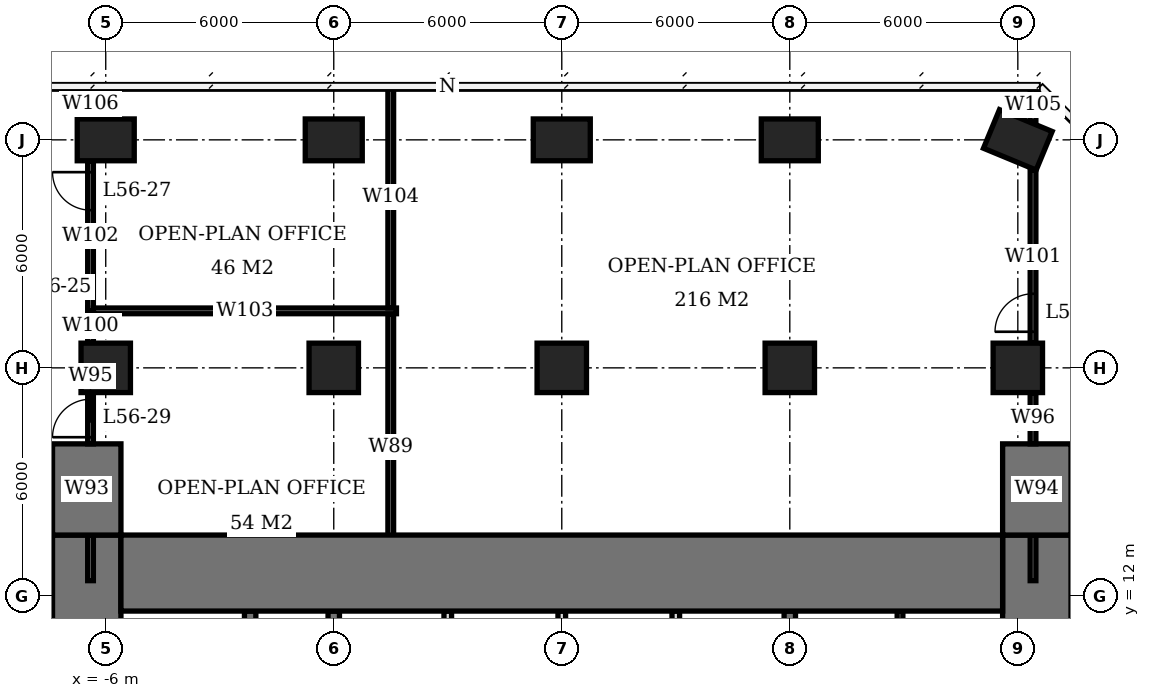
"""IFC4 building model, lengths in metres.
Left out: names, types, materials, properties, quantities, classifications, styles, units other than length and angle.
Written with IfcOpenShell. Run it as: python <this file> out.ifc"""

import sys

from ifc_helpers import new_model, si_unit, direction, frame, frame_2d, origin, origin_2d, place, context, subcontext, project, spatial, rectangle, extrude, element, fill, save


model = new_model("IFC4")
c1 = context("Model", 3, precision=1e-05, world=origin(), true_north=direction((0.0, 1.0)))
c2 = subcontext(c1, "Body", "Model", "MODEL_VIEW")
j1 = project(units=[si_unit("LENGTHUNIT", "METRE"), si_unit("PLANEANGLEUNIT", "RADIAN")], contexts=[c1])
p1 = place(None, origin())
s1 = spatial("IfcSite", under=j1, at=p1, CompositionType="ELEMENT")
p2 = place(p1, origin())
s2 = spatial("IfcBuilding", under=s1, at=p2, CompositionType="ELEMENT")
p3 = place(p2, frame((0.0, 0.0, 227.9)))
s3 = spatial("IfcBuildingStorey", under=s2, at=p3, CompositionType="ELEMENT", Elevation=227.9)
p4 = place(p3, frame((-6.0, 18.0, 0.0), z_axis=(0.0, 0.0, 1.0), x_axis=(1.0, 0.0, 0.0)))
e1 = element("IfcColumn", 1, at=p4, inside=s3, PredefinedType="COLUMN", context=c2, shape_type="SweptSolid", body=[
    extrude(rectangle(XDim=1.3, YDim=1.3, at=origin_2d()), origin(), (0.0, 0.0, 1.0), 3.9),
])
p5 = place(p3, frame((-6.0, 24.0, 0.0), z_axis=(0.0, 0.0, 1.0), x_axis=(1.0, 0.0, 0.0)))
e2 = element("IfcColumn", 2, at=p5, inside=s3, PredefinedType="COLUMN", context=c2, shape_type="SweptSolid", body=[
    extrude(rectangle(XDim=1.5, YDim=1.1, at=origin_2d()), origin(), (0.0, 0.0, 1.0), 3.9),
])
p6 = place(p3, frame((0.0, 18.0, 0.0), z_axis=(0.0, 0.0, 1.0), x_axis=(1.0, 0.0, 0.0)))
e3 = element("IfcColumn", 3, at=p6, inside=s3, PredefinedType="COLUMN", context=c2, shape_type="SweptSolid", body=[
    extrude(rectangle(XDim=1.3, YDim=1.3, at=origin_2d()), origin(), (0.0, 0.0, 1.0), 3.9),
])
p7 = place(p3, frame((0.0, 24.0, 0.0), z_axis=(0.0, 0.0, 1.0), x_axis=(1.0, 0.0, 0.0)))
e4 = element("IfcColumn", 4, at=p7, inside=s3, PredefinedType="COLUMN", context=c2, shape_type="SweptSolid", body=[
    extrude(rectangle(XDim=1.5, YDim=1.1, at=origin_2d()), origin(), (0.0, 0.0, 1.0), 3.9),
])
p8 = place(p3, frame((6.0, 18.0, 0.0), z_axis=(0.0, 0.0, 1.0), x_axis=(1.0, 0.0, 0.0)))
e5 = element("IfcColumn", 5, at=p8, inside=s3, PredefinedType="COLUMN", context=c2, shape_type="SweptSolid", body=[
    extrude(rectangle(XDim=1.3, YDim=1.3, at=origin_2d()), origin(), (0.0, 0.0, 1.0), 3.9),
])
p9 = place(p3, frame((6.0, 24.0, 0.0), z_axis=(0.0, 0.0, 1.0), x_axis=(1.0, 0.0, 0.0)))
e6 = element("IfcColumn", 6, at=p9, inside=s3, PredefinedType="COLUMN", context=c2, shape_type="SweptSolid", body=[
    extrude(rectangle(XDim=1.5, YDim=1.1, at=origin_2d()), origin(), (0.0, 0.0, 1.0), 3.9),
])
p10 = place(p3, frame((12.0, 18.0, 0.0), z_axis=(0.0, 0.0, 1.0), x_axis=(1.0, 0.0, 0.0)))
e7 = element("IfcColumn", 7, at=p10, inside=s3, PredefinedType="COLUMN", context=c2, shape_type="SweptSolid", body=[
    extrude(rectangle(XDim=1.3, YDim=1.3, at=origin_2d()), origin(), (0.0, 0.0, 1.0), 3.9),
])
p11 = place(p3, frame((12.0, 24.0, 0.0), z_axis=(0.0, 0.0, 1.0), x_axis=(1.0, 0.0, 0.0)))
e8 = element("IfcColumn", 8, at=p11, inside=s3, PredefinedType="COLUMN", context=c2, shape_type="SweptSolid", body=[
    extrude(rectangle(XDim=1.5, YDim=1.1, at=origin_2d()), origin(), (0.0, 0.0, 1.0), 3.9),
])
p12 = place(p3, frame((18.0, 18.0, 0.0), z_axis=(0.0, 0.0, 1.0), x_axis=(1.0, 0.0, 0.0)))
e9 = element("IfcColumn", 9, at=p12, inside=s3, PredefinedType="COLUMN", context=c2, shape_type="SweptSolid", body=[
    extrude(rectangle(XDim=1.3, YDim=1.3, at=origin_2d()), origin(), (0.0, 0.0, 1.0), 3.9),
])
p13 = place(p3, frame((18.0, 24.0, 0.0), z_axis=(0.0, 0.0, 1.0), x_axis=(0.923879532511, -0.382683432365, 0.0)))
e10 = element("IfcColumn", 10, at=p13, inside=s3, PredefinedType="COLUMN", context=c2, shape_type="SweptSolid", body=[
    extrude(rectangle(XDim=1.5, YDim=1.1, at=origin_2d()), origin(), (0.0, 0.0, 1.0), 3.9),
])
p14 = place(p3, frame((-5.6, 12.6, 0.0), z_axis=(0.0, 0.0, 1.0), x_axis=(1.0, 0.0, 0.0)))
e11 = element("IfcWall", 11, at=p14, inside=s3, PredefinedType="SHEAR", context=c2, shape_type="SweptSolid", body=[
    extrude(rectangle(XDim=23.2, YDim=2.0, at=frame_2d((11.6, 0.0))), origin(), (0.0, 0.0, 1.0), 3.9),
])
p15 = place(p3, frame((-6.5, -7.6, 0.0), z_axis=(0.0, 0.0, 1.0), x_axis=(0.0, 1.0, 0.0)))
e12 = element("IfcWall", 12, at=p15, inside=s3, PredefinedType="SHEAR", context=c2, shape_type="SweptSolid", body=[
    extrude(rectangle(XDim=21.2, YDim=1.8, at=frame_2d((10.6, 0.0))), origin(), (0.0, 0.0, 1.0), 3.9),
])
p16 = place(p15, frame((7.8, 0.0, 0.0)))
e13 = element("IfcOpeningElement", 13, at=p16, cuts=e12, PredefinedType="OPENING", context=c2, shape_type="SweptSolid", body=[
    extrude(rectangle(XDim=1.8, YDim=2.4, at=frame_2d((0.9, 1.2))), frame((0.0, 0.91, 0.0), z_axis=(0.0, -1.0, 0.0), x_axis=(1.0, 0.0, 0.0)), (0.0, 0.0, 1.0), 1.82),
])
p17 = place(p3, frame((18.5, -7.6, 0.0), z_axis=(0.0, 0.0, 1.0), x_axis=(0.0, 1.0, 0.0)))
e14 = element("IfcWall", 14, at=p17, inside=s3, PredefinedType="SHEAR", context=c2, shape_type="SweptSolid", body=[
    extrude(rectangle(XDim=21.2, YDim=1.8, at=frame_2d((10.6, 0.0))), origin(), (0.0, 0.0, 1.0), 3.9),
])
p18 = place(p17, frame((9.2, 0.0, 0.0)))
e15 = element("IfcOpeningElement", 15, at=p18, cuts=e14, PredefinedType="OPENING", context=c2, shape_type="SweptSolid", body=[
    extrude(rectangle(XDim=1.8, YDim=2.4, at=frame_2d((0.9, 1.2))), frame((0.0, 0.91, 0.0), z_axis=(0.0, -1.0, 0.0), x_axis=(1.0, 0.0, 0.0)), (0.0, 0.0, 1.0), 1.82),
])
for number, where, z_axis, x_axis in (
    (16, (-6.5, 13.6, 0.0), (0.0, 0.0, 1.0), (0.0, 1.0, 0.0)),
    (17, (18.5, 13.6, 0.0), (0.0, 0.0, 1.0), (0.0, 1.0, 0.0)),
):
    element("IfcWall", number, at=place(p3, frame(where, z_axis=z_axis, x_axis=x_axis)), inside=s3, PredefinedType="SHEAR", context=c2, shape_type="SweptSolid", body=[
        extrude(rectangle(XDim=2.4, YDim=1.8, at=frame_2d((1.2, 0.0))), origin(), (0.0, 0.0, 1.0), 3.9),
    ])
p19 = place(p3, frame((0.0, 3.15, 0.0), z_axis=(0.0, 0.0, 1.0), x_axis=(0.0, 1.0, 0.0)))
e18 = element("IfcWall", 18, at=p19, inside=s3, PredefinedType="SHEAR", context=c2, shape_type="SweptSolid", body=[
    extrude(rectangle(XDim=8.45, YDim=0.3, at=frame_2d((4.225, 0.0))), origin(), (0.0, 0.0, 1.0), 3.9),
])
p20 = place(p3, frame((12.0, 6.15, 0.0), z_axis=(0.0, 0.0, 1.0), x_axis=(0.0, 1.0, 0.0)))
e19 = element("IfcWall", 19, at=p20, inside=s3, PredefinedType="SHEAR", context=c2, shape_type="SweptSolid", body=[
    extrude(rectangle(XDim=5.45, YDim=0.3, at=frame_2d((2.725, 0.0))), origin(), (0.0, 0.0, 1.0), 3.9),
])
p21 = place(p3, frame((-2.2, 3.15, 0.0), z_axis=(0.0, 0.0, 1.0), x_axis=(0.0, 1.0, 0.0)))
e20 = element("IfcWall", 20, at=p21, inside=s3, PredefinedType="SHEAR", context=c2, shape_type="SweptSolid", body=[
    extrude(rectangle(XDim=8.45, YDim=0.3, at=frame_2d((4.225, 0.0))), origin(), (0.0, 0.0, 1.0), 3.9),
])
for number, where, z_axis, x_axis in (
    (21, (3.0, 6.15, 0.0), (0.0, 0.0, 1.0), (0.0, 1.0, 0.0)),
    (22, (6.0, 6.15, 0.0), (0.0, 0.0, 1.0), (0.0, 1.0, 0.0)),
    (23, (9.0, 6.15, 0.0), (0.0, 0.0, 1.0), (0.0, 1.0, 0.0)),
):
    element("IfcWall", number, at=place(p3, frame(where, z_axis=z_axis, x_axis=x_axis)), inside=s3, PredefinedType="SOLIDWALL", context=c2, shape_type="SweptSolid", body=[
        extrude(rectangle(XDim=5.45, YDim=0.2, at=frame_2d((2.725, 0.0))), origin(), (0.0, 0.0, 1.0), 3.9),
    ])
p22 = place(p3, frame((14.9, 6.15, 0.0), z_axis=(0.0, 0.0, 1.0), x_axis=(0.0, 1.0, 0.0)))
e24 = element("IfcWall", 24, at=p22, inside=s3, PredefinedType="PLUMBINGWALL", context=c2, shape_type="SweptSolid", body=[
    extrude(rectangle(XDim=5.45, YDim=0.15, at=frame_2d((2.725, 0.0))), origin(), (0.0, 0.0, 1.0), 3.65),
])
p23 = place(p3, frame((-6.4, 12.4, 0.0), z_axis=(0.0, 0.0, 1.0), x_axis=(0.0, 1.0, 0.0)))
e25 = element("IfcWall", 25, at=p23, inside=s3, PredefinedType="PARTITIONING", context=c2, shape_type="SweptSolid", body=[
    extrude(rectangle(XDim=1.2, YDim=0.15, at=frame_2d((0.6, 0.0))), origin(), (0.0, 0.0, 1.0), 3.65),
])
p24 = place(p3, frame((-6.4, 16.0, 0.0), z_axis=(0.0, 0.0, 1.0), x_axis=(0.0, 1.0, 0.0)))
e26 = element("IfcWall", 26, at=p24, inside=s3, PredefinedType="PARTITIONING", context=c2, shape_type="SweptSolid", body=[
    extrude(rectangle(XDim=1.35, YDim=0.15, at=frame_2d((0.675, 0.0))), origin(), (0.0, 0.0, 1.0), 3.65),
])
p25 = place(p24, frame((0.175, 0.0, 0.0)))
e27 = element("IfcOpeningElement", 27, at=p25, cuts=e26, PredefinedType="OPENING", context=c2, shape_type="SweptSolid", body=[
    extrude(rectangle(XDim=1.0, YDim=2.1, at=frame_2d((0.5, 1.05))), frame((0.0, 0.085, 0.0), z_axis=(0.0, -1.0, 0.0), x_axis=(1.0, 0.0, 0.0)), (0.0, 0.0, 1.0), 0.17),
])
p26 = place(p3, frame((-6.4, 18.65, 0.0), z_axis=(0.0, 0.0, 1.0), x_axis=(0.0, 1.0, 0.0)))
e28 = element("IfcWall", 28, at=p26, inside=s3, PredefinedType="PARTITIONING", context=c2, shape_type="SweptSolid", body=[
    extrude(rectangle(XDim=0.925, YDim=0.15, at=frame_2d((0.462, 0.0))), origin(), (0.0, 0.0, 1.0), 3.65),
])
p27 = place(p3, frame((-6.4, 19.5, 0.0), z_axis=(0.0, 0.0, 1.0), x_axis=(0.0, 1.0, 0.0)))
e29 = element("IfcWall", 29, at=p27, inside=s3, PredefinedType="PARTITIONING", context=c2, shape_type="SweptSolid", body=[
    extrude(rectangle(XDim=3.95, YDim=0.15, at=frame_2d((1.975, 0.0))), origin(), (0.0, 0.0, 1.0), 3.65),
])
p28 = place(p27, frame((2.65, 0.0, 0.0)))
e30 = element("IfcOpeningElement", 30, at=p28, cuts=e29, PredefinedType="OPENING", context=c2, shape_type="SweptSolid", body=[
    extrude(rectangle(XDim=1.0, YDim=2.1, at=frame_2d((0.5, 1.05))), frame((0.0, 0.085, 0.0), z_axis=(0.0, -1.0, 0.0), x_axis=(1.0, 0.0, 0.0)), (0.0, 0.0, 1.0), 0.17),
])
p29 = place(p3, frame((-6.4, 24.55, 0.0), z_axis=(0.0, 0.0, 1.0), x_axis=(0.0, 1.0, 0.0)))
e31 = element("IfcWall", 31, at=p29, inside=s3, PredefinedType="PARTITIONING", context=c2, shape_type="SweptSolid", body=[
    extrude(rectangle(XDim=0.8, YDim=0.15, at=frame_2d((0.4, 0.0))), origin(), (0.0, 0.0, 1.0), 3.65),
])
p30 = place(p3, frame((-6.325, 19.5, 0.0), z_axis=(0.0, 0.0, 1.0), x_axis=(1.0, 0.0, 0.0)))
e32 = element("IfcWall", 32, at=p30, inside=s3, PredefinedType="PARTITIONING", context=c2, shape_type="SweptSolid", body=[
    extrude(rectangle(XDim=7.975, YDim=0.15, at=frame_2d((3.987, 0.0))), origin(), (0.0, 0.0, 1.0), 3.65),
])
p31 = place(p3, frame((1.5, 12.4, 0.0), z_axis=(0.0, 0.0, 1.0), x_axis=(0.0, 1.0, 0.0)))
e33 = element("IfcWall", 33, at=p31, inside=s3, PredefinedType="PARTITIONING", context=c2, shape_type="SweptSolid", body=[
    extrude(rectangle(XDim=7.025, YDim=0.15, at=frame_2d((3.513, 0.0))), origin(), (0.0, 0.0, 1.0), 3.65),
])
p32 = place(p3, frame((1.5, 19.575, 0.0), z_axis=(0.0, 0.0, 1.0), x_axis=(0.0, 1.0, 0.0)))
e34 = element("IfcWall", 34, at=p32, inside=s3, PredefinedType="PARTITIONING", context=c2, shape_type="SweptSolid", body=[
    extrude(rectangle(XDim=5.825, YDim=0.15, at=frame_2d((2.913, 0.0))), origin(), (0.0, 0.0, 1.0), 3.65),
])
p33 = place(p3, frame((18.4, 12.4, 0.0), z_axis=(0.0, 0.0, 1.0), x_axis=(0.0, 1.0, 0.0)))
e35 = element("IfcWall", 35, at=p33, inside=s3, PredefinedType="PARTITIONING", context=c2, shape_type="SweptSolid", body=[
    extrude(rectangle(XDim=1.2, YDim=0.15, at=frame_2d((0.6, 0.0))), origin(), (0.0, 0.0, 1.0), 3.65),
])
p34 = place(p3, frame((18.4, 16.0, 0.0), z_axis=(0.0, 0.0, 1.0), x_axis=(0.0, 1.0, 0.0)))
e36 = element("IfcWall", 36, at=p34, inside=s3, PredefinedType="PARTITIONING", context=c2, shape_type="SweptSolid", body=[
    extrude(rectangle(XDim=1.35, YDim=0.15, at=frame_2d((0.675, 0.0))), origin(), (0.0, 0.0, 1.0), 3.65),
])
p35 = place(p3, frame((18.4, 18.65, 0.0), z_axis=(0.0, 0.0, 1.0), x_axis=(0.0, 1.0, 0.0)))
e37 = element("IfcWall", 37, at=p35, inside=s3, PredefinedType="PARTITIONING", context=c2, shape_type="SweptSolid", body=[
    extrude(rectangle(XDim=4.558, YDim=0.15, at=frame_2d((2.279, 0.0))), origin(), (0.0, 0.0, 1.0), 3.65),
])
p36 = place(p35, frame((0.3, 0.0, 0.0)))
e38 = element("IfcOpeningElement", 38, at=p36, cuts=e37, PredefinedType="OPENING", context=c2, shape_type="SweptSolid", body=[
    extrude(rectangle(XDim=1.0, YDim=2.1, at=frame_2d((0.5, 1.05))), frame((0.0, 0.085, 0.0), z_axis=(0.0, -1.0, 0.0), x_axis=(1.0, 0.0, 0.0)), (0.0, 0.0, 1.0), 0.17),
])
p37 = place(p3, frame((18.4, 24.461, 0.0), z_axis=(0.0, 0.0, 1.0), x_axis=(0.0, 1.0, 0.0)))
e39 = element("IfcWall", 39, at=p37, inside=s3, PredefinedType="PARTITIONING", context=c2, shape_type="SweptSolid", body=[
    extrude(rectangle(XDim=0.939, YDim=0.15, at=frame_2d((0.47, 0.0))), origin(), (0.0, 0.0, 1.0), 3.65),
])
p38 = place(p36, origin())
e40 = element("IfcDoor", 40, at=p38, inside=s3, OperationType="SINGLE_SWING_LEFT", PredefinedType="DOOR", context=c2, shape_type="SweptSolid", body=[
    extrude(rectangle(XDim=1.0, YDim=2.1, at=frame_2d((0.5, 1.05))), frame((0.0, 0.025, 0.0), z_axis=(0.0, -1.0, 0.0), x_axis=(1.0, 0.0, 0.0)), (0.0, 0.0, 1.0), 0.05),
])
fill(e38, e40)
p39 = place(p28, origin())
e41 = element("IfcDoor", 41, at=p39, inside=s3, OperationType="SINGLE_SWING_RIGHT", PredefinedType="DOOR", context=c2, shape_type="SweptSolid", body=[
    extrude(rectangle(XDim=1.0, YDim=2.1, at=frame_2d((0.5, 1.05))), frame((0.0, 0.025, 0.0), z_axis=(0.0, -1.0, 0.0), x_axis=(1.0, 0.0, 0.0)), (0.0, 0.0, 1.0), 0.05),
])
fill(e30, e41)
p40 = place(p25, origin())
e42 = element("IfcDoor", 42, at=p40, inside=s3, OperationType="SINGLE_SWING_LEFT", PredefinedType="DOOR", context=c2, shape_type="SweptSolid", body=[
    extrude(rectangle(XDim=1.0, YDim=2.1, at=frame_2d((0.5, 1.05))), frame((0.0, 0.025, 0.0), z_axis=(0.0, -1.0, 0.0), x_axis=(1.0, 0.0, 0.0)), (0.0, 0.0, 1.0), 0.05),
])
fill(e27, e42)
save(model, sys.argv[1])
